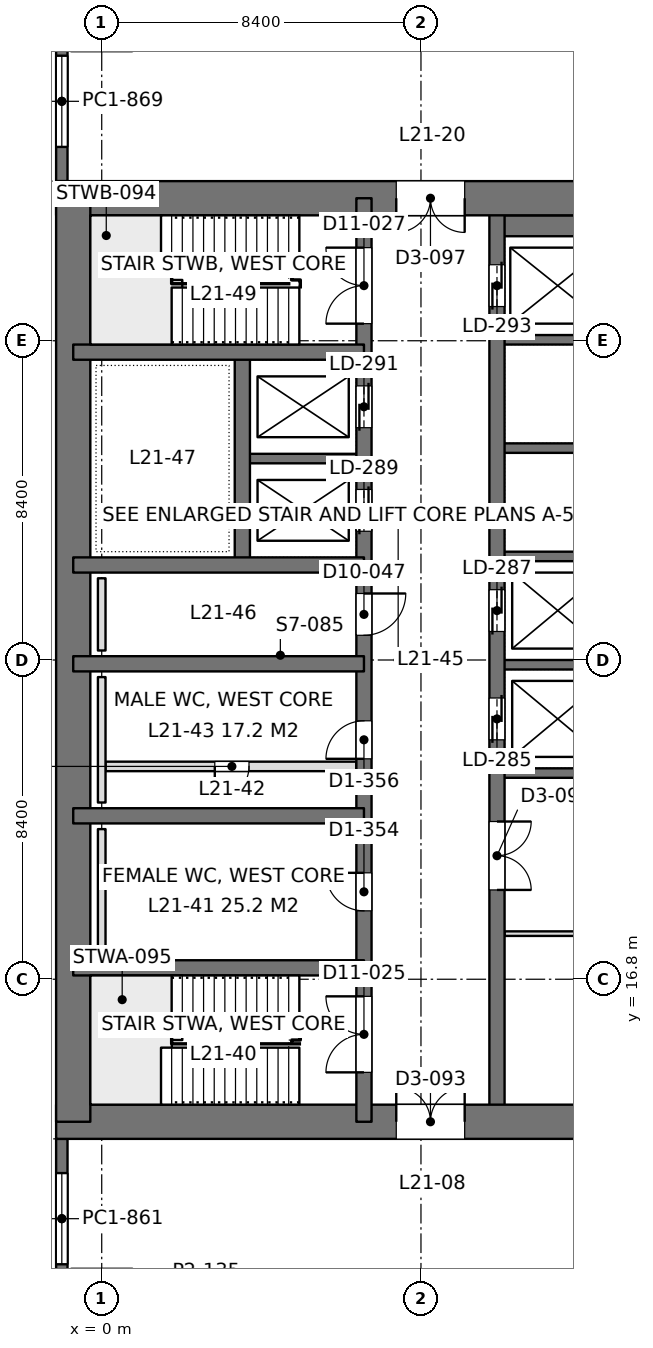
"""IFC4 building model, lengths in metres.
Left out: names, types, materials, properties, quantities, classifications, styles, units other than length and angle.
Written with IfcOpenShell. Run it as: python <this file> out.ifc"""

import sys

from ifc_helpers import new_model, si_unit, direction, frame, frame_2d, origin, place, context, subcontext, project, spatial, rectangle, extrude, element, fill, save


model = new_model("IFC4")
c1 = context("Model", 3, precision=1e-05, world=origin(), true_north=direction((0.0, 1.0)))
c2 = subcontext(c1, "Body", "Model", "MODEL_VIEW")
j1 = project(units=[si_unit("LENGTHUNIT", "METRE"), si_unit("PLANEANGLEUNIT", "RADIAN")], contexts=[c1])
p1 = place(None, origin())
s1 = spatial("IfcSite", under=j1, at=p1, CompositionType="ELEMENT")
p2 = place(p1, origin())
s2 = spatial("IfcBuilding", under=s1, at=p2, CompositionType="ELEMENT")
p3 = place(p2, frame((0.0, 0.0, 96.3)))
s3 = spatial("IfcBuildingStorey", under=s2, at=p3, CompositionType="ELEMENT", Elevation=96.3)
p4 = place(p3, frame((-1.2, 13.05, 0.0), z_axis=(0.0, 0.0, 1.0), x_axis=(1.0, 0.0, 0.0)))
e1 = element("IfcWall", 1, at=p4, inside=s3, PredefinedType="SHEAR", context=c2, shape_type="SweptSolid", body=[
    extrude(rectangle(XDim=18.0, YDim=0.9, at=frame_2d((9.0, 0.0))), origin(), (0.0, 0.0, 1.0), 4.5),
])
p5 = place(p4, frame((8.95, 0.0, 0.0)))
e2 = element("IfcOpeningElement", 2, at=p5, cuts=e1, PredefinedType="OPENING", context=c2, shape_type="SweptSolid", body=[
    extrude(rectangle(XDim=1.8, YDim=2.4, at=frame_2d((0.9, 1.2))), frame((0.0, 0.46, 0.0), z_axis=(0.0, -1.0, 0.0), x_axis=(1.0, 0.0, 0.0)), (0.0, 0.0, 1.0), 0.92),
])
p6 = place(p3, frame((-1.2, 37.35, 0.0), z_axis=(0.0, 0.0, 1.0), x_axis=(1.0, 0.0, 0.0)))
e3 = element("IfcWall", 3, at=p6, inside=s3, PredefinedType="SHEAR", context=c2, shape_type="SweptSolid", body=[
    extrude(rectangle(XDim=18.0, YDim=0.9, at=frame_2d((9.0, 0.0))), origin(), (0.0, 0.0, 1.0), 4.5),
])
p7 = place(p6, frame((8.95, 0.0, 0.0)))
e4 = element("IfcOpeningElement", 4, at=p7, cuts=e3, PredefinedType="OPENING", context=c2, shape_type="SweptSolid", body=[
    extrude(rectangle(XDim=1.8, YDim=2.4, at=frame_2d((0.9, 1.2))), frame((0.0, 0.46, 0.0), z_axis=(0.0, -1.0, 0.0), x_axis=(1.0, 0.0, 0.0)), (0.0, 0.0, 1.0), 0.92),
])
p8 = place(p3, frame((-0.75, 13.05, 0.0), z_axis=(0.0, 0.0, 1.0), x_axis=(0.0, 1.0, 0.0)))
e5 = element("IfcWall", 5, at=p8, inside=s3, PredefinedType="SHEAR", context=c2, shape_type="SweptSolid", body=[
    extrude(rectangle(XDim=24.3, YDim=0.9, at=frame_2d((12.15, 0.0))), origin(), (0.0, 0.0, 1.0), 4.5),
])
p9 = place(p3, frame((6.9, 13.05, 0.0), z_axis=(0.0, 0.0, 1.0), x_axis=(0.0, 1.0, 0.0)))
e6 = element("IfcWall", 6, at=p9, inside=s3, PredefinedType="SHEAR", context=c2, shape_type="SweptSolid", body=[
    extrude(rectangle(XDim=24.3, YDim=0.4, at=frame_2d((12.15, 0.0))), origin(), (0.0, 0.0, 1.0), 4.5),
])
p10 = place(p9, frame((1.3, 0.0, 0.0)))
e7 = element("IfcOpeningElement", 7, at=p10, cuts=e6, PredefinedType="OPENING", context=c2, shape_type="SweptSolid", body=[
    extrude(rectangle(XDim=2.0, YDim=2.2, at=frame_2d((1.0, 1.1))), frame((0.0, 0.21, 0.0), z_axis=(0.0, -1.0, 0.0), x_axis=(1.0, 0.0, 0.0)), (0.0, 0.0, 1.0), 0.42),
])
p11 = place(p9, frame((21.0, 0.0, 0.0)))
e8 = element("IfcOpeningElement", 8, at=p11, cuts=e6, PredefinedType="OPENING", context=c2, shape_type="SweptSolid", body=[
    extrude(rectangle(XDim=2.0, YDim=2.2, at=frame_2d((1.0, 1.1))), frame((0.0, 0.21, 0.0), z_axis=(0.0, -1.0, 0.0), x_axis=(1.0, 0.0, 0.0)), (0.0, 0.0, 1.0), 0.42),
])
p12 = place(p9, frame((5.55, 0.0, 0.0)))
e9 = element("IfcOpeningElement", 9, at=p12, cuts=e6, PredefinedType="OPENING", context=c2, shape_type="SweptSolid", body=[
    extrude(rectangle(XDim=1.0, YDim=2.2, at=frame_2d((0.5, 1.1))), frame((0.0, 0.21, 0.0), z_axis=(0.0, -1.0, 0.0), x_axis=(1.0, 0.0, 0.0)), (0.0, 0.0, 1.0), 0.42),
])
p13 = place(p9, frame((9.55, 0.0, 0.0)))
e10 = element("IfcOpeningElement", 10, at=p13, cuts=e6, PredefinedType="OPENING", context=c2, shape_type="SweptSolid", body=[
    extrude(rectangle(XDim=1.0, YDim=2.2, at=frame_2d((0.5, 1.1))), frame((0.0, 0.21, 0.0), z_axis=(0.0, -1.0, 0.0), x_axis=(1.0, 0.0, 0.0)), (0.0, 0.0, 1.0), 0.42),
])
p14 = place(p9, frame((12.8, 0.0, 0.0)))
e11 = element("IfcOpeningElement", 11, at=p14, cuts=e6, PredefinedType="OPENING", context=c2, shape_type="SweptSolid", body=[
    extrude(rectangle(XDim=1.1, YDim=2.2, at=frame_2d((0.55, 1.1))), frame((0.0, 0.21, 0.0), z_axis=(0.0, -1.0, 0.0), x_axis=(1.0, 0.0, 0.0)), (0.0, 0.0, 1.0), 0.42),
])
p15 = place(p9, frame((15.538, 0.0, 0.0)))
e12 = element("IfcOpeningElement", 12, at=p15, cuts=e6, PredefinedType="OPENING", context=c2, shape_type="SweptSolid", body=[
    extrude(rectangle(XDim=1.1, YDim=2.2, at=frame_2d((0.55, 1.1))), frame((0.0, 0.21, 0.0), z_axis=(0.0, -1.0, 0.0), x_axis=(1.0, 0.0, 0.0)), (0.0, 0.0, 1.0), 0.42),
])
p16 = place(p9, frame((18.262, 0.0, 0.0)))
e13 = element("IfcOpeningElement", 13, at=p16, cuts=e6, PredefinedType="OPENING", context=c2, shape_type="SweptSolid", body=[
    extrude(rectangle(XDim=1.1, YDim=2.2, at=frame_2d((0.55, 1.1))), frame((0.0, 0.21, 0.0), z_axis=(0.0, -1.0, 0.0), x_axis=(1.0, 0.0, 0.0)), (0.0, 0.0, 1.0), 0.42),
])
p17 = place(p3, frame((10.4, 13.05, 0.0), z_axis=(0.0, 0.0, 1.0), x_axis=(0.0, 1.0, 0.0)))
e14 = element("IfcWall", 14, at=p17, inside=s3, PredefinedType="SHEAR", context=c2, shape_type="SweptSolid", body=[
    extrude(rectangle(XDim=24.3, YDim=0.4, at=frame_2d((12.15, 0.0))), origin(), (0.0, 0.0, 1.0), 4.5),
])
p18 = place(p17, frame((10.05, 0.0, 0.0)))
e15 = element("IfcOpeningElement", 15, at=p18, cuts=e14, PredefinedType="OPENING", context=c2, shape_type="SweptSolid", body=[
    extrude(rectangle(XDim=1.1, YDim=2.2, at=frame_2d((0.55, 1.1))), frame((0.0, 0.21, 0.0), z_axis=(0.0, -1.0, 0.0), x_axis=(1.0, 0.0, 0.0)), (0.0, 0.0, 1.0), 0.42),
])
p19 = place(p17, frame((12.9, 0.0, 0.0)))
e16 = element("IfcOpeningElement", 16, at=p19, cuts=e14, PredefinedType="OPENING", context=c2, shape_type="SweptSolid", body=[
    extrude(rectangle(XDim=1.1, YDim=2.2, at=frame_2d((0.55, 1.1))), frame((0.0, 0.21, 0.0), z_axis=(0.0, -1.0, 0.0), x_axis=(1.0, 0.0, 0.0)), (0.0, 0.0, 1.0), 0.42),
])
p20 = place(p17, frame((21.45, 0.0, 0.0)))
e17 = element("IfcOpeningElement", 17, at=p20, cuts=e14, PredefinedType="OPENING", context=c2, shape_type="SweptSolid", body=[
    extrude(rectangle(XDim=1.1, YDim=2.2, at=frame_2d((0.55, 1.1))), frame((0.0, 0.21, 0.0), z_axis=(0.0, -1.0, 0.0), x_axis=(1.0, 0.0, 0.0)), (0.0, 0.0, 1.0), 0.42),
])
p21 = place(p17, frame((6.1, 0.0, 0.0)))
e18 = element("IfcOpeningElement", 18, at=p21, cuts=e14, PredefinedType="OPENING", context=c2, shape_type="SweptSolid", body=[
    extrude(rectangle(XDim=1.8, YDim=2.4, at=frame_2d((0.9, 1.2))), frame((0.0, 0.21, 0.0), z_axis=(0.0, -1.0, 0.0), x_axis=(1.0, 0.0, 0.0)), (0.0, 0.0, 1.0), 0.42),
])
for number, where, z_axis, x_axis in (
    (19, (-0.75, 17.1, 0.0), (0.0, 0.0, 1.0), (1.0, 0.0, 0.0)),
    (20, (-0.75, 21.1, 0.0), (0.0, 0.0, 1.0), (1.0, 0.0, 0.0)),
    (21, (-0.75, 25.1, 0.0), (0.0, 0.0, 1.0), (1.0, 0.0, 0.0)),
    (22, (-0.75, 27.7, 0.0), (0.0, 0.0, 1.0), (1.0, 0.0, 0.0)),
    (23, (-0.75, 33.3, 0.0), (0.0, 0.0, 1.0), (1.0, 0.0, 0.0)),
):
    element("IfcWall", number, at=place(p3, frame(where, z_axis=z_axis, x_axis=x_axis)), inside=s3, PredefinedType="SHEAR", context=c2, shape_type="SweptSolid", body=[
        extrude(rectangle(XDim=7.65, YDim=0.4, at=frame_2d((3.825, 0.0))), origin(), (0.0, 0.0, 1.0), 4.5),
    ])
p22 = place(p3, frame((3.7, 27.7, 0.0), z_axis=(0.0, 0.0, 1.0), x_axis=(0.0, 1.0, 0.0)))
e24 = element("IfcWall", 24, at=p22, inside=s3, PredefinedType="SHEAR", context=c2, shape_type="SweptSolid", body=[
    extrude(rectangle(XDim=5.6, YDim=0.4, at=frame_2d((2.8, 0.0))), origin(), (0.0, 0.0, 1.0), 4.5),
])
p23 = place(p3, frame((3.7, 30.5, 0.0), z_axis=(0.0, 0.0, 1.0), x_axis=(1.0, 0.0, 0.0)))
e25 = element("IfcWall", 25, at=p23, inside=s3, PredefinedType="SHEAR", context=c2, shape_type="SweptSolid", body=[
    extrude(rectangle(XDim=3.2, YDim=0.25, at=frame_2d((1.6, 0.0))), origin(), (0.0, 0.0, 1.0), 4.5),
])
p24 = place(p3, frame((10.4, 22.225, 0.0), z_axis=(0.0, 0.0, 1.0), x_axis=(1.0, 0.0, 0.0)))
e26 = element("IfcWall", 26, at=p24, inside=s3, PredefinedType="SHEAR", context=c2, shape_type="SweptSolid", body=[
    extrude(rectangle(XDim=5.95, YDim=0.25, at=frame_2d((2.975, 0.0))), origin(), (0.0, 0.0, 1.0), 4.5),
])
for number, where, z_axis, x_axis in (
    (27, (10.4, 25.075, 0.0), (0.0, 0.0, 1.0), (1.0, 0.0, 0.0)),
    (28, (10.4, 27.925, 0.0), (0.0, 0.0, 1.0), (1.0, 0.0, 0.0)),
    (29, (10.4, 30.775, 0.0), (0.0, 0.0, 1.0), (1.0, 0.0, 0.0)),
    (30, (10.4, 33.625, 0.0), (0.0, 0.0, 1.0), (1.0, 0.0, 0.0)),
):
    element("IfcWall", number, at=place(p3, frame(where, z_axis=z_axis, x_axis=x_axis)), inside=s3, PredefinedType="SHEAR", context=c2, shape_type="SweptSolid", body=[
        extrude(rectangle(XDim=3.2, YDim=0.25, at=frame_2d((1.6, 0.0))), origin(), (0.0, 0.0, 1.0), 4.5),
    ])
p25 = place(p3, frame((10.4, 36.625, 0.0), z_axis=(0.0, 0.0, 1.0), x_axis=(1.0, 0.0, 0.0)))
e31 = element("IfcWall", 31, at=p25, inside=s3, PredefinedType="SHEAR", context=c2, shape_type="SweptSolid", body=[
    extrude(rectangle(XDim=3.2, YDim=0.55, at=frame_2d((1.6, 0.0))), origin(), (0.0, 0.0, 1.0), 4.5),
])
p26 = place(p3, frame((-1.05, 8.4, 0.0), z_axis=(0.0, 0.0, 1.0), x_axis=(0.0, 1.0, 0.0)))
e32 = element("IfcWall", 32, at=p26, inside=s3, PredefinedType="SOLIDWALL", context=c2, shape_type="SweptSolid", body=[
    extrude(rectangle(XDim=4.2, YDim=0.3, at=frame_2d((2.1, 0.0))), origin(), (0.0, 0.0, 1.0), 4.35),
])
p27 = place(p26, frame((0.9, 0.0, 0.9)))
e33 = element("IfcOpeningElement", 33, at=p27, cuts=e32, PredefinedType="OPENING", context=c2, shape_type="SweptSolid", body=[
    extrude(rectangle(XDim=2.4, YDim=1.9, at=frame_2d((1.2, 0.95))), frame((0.0, 0.16, 0.0), z_axis=(0.0, -1.0, 0.0), x_axis=(1.0, 0.0, 0.0)), (0.0, 0.0, 1.0), 0.32),
])
p28 = place(p3, frame((-1.05, 37.8, 0.0), z_axis=(0.0, 0.0, 1.0), x_axis=(0.0, 1.0, 0.0)))
e34 = element("IfcWall", 34, at=p28, inside=s3, PredefinedType="SOLIDWALL", context=c2, shape_type="SweptSolid", body=[
    extrude(rectangle(XDim=4.2, YDim=0.3, at=frame_2d((2.1, 0.0))), origin(), (0.0, 0.0, 1.0), 4.35),
])
p29 = place(p28, frame((0.9, 0.0, 0.9)))
e35 = element("IfcOpeningElement", 35, at=p29, cuts=e34, PredefinedType="OPENING", context=c2, shape_type="SweptSolid", body=[
    extrude(rectangle(XDim=2.4, YDim=1.9, at=frame_2d((1.2, 0.95))), frame((0.0, 0.16, 0.0), z_axis=(0.0, -1.0, 0.0), x_axis=(1.0, 0.0, 0.0)), (0.0, 0.0, 1.0), 0.32),
])
p30 = place(p3, frame((10.598, 18.0, 0.0), z_axis=(0.0, 0.0, 1.0), x_axis=(1.0, 0.0, 0.0)))
e36 = element("IfcWall", 36, at=p30, inside=s3, PredefinedType="PARTITIONING", context=c2, shape_type="SweptSolid", body=[
    extrude(rectangle(XDim=5.904, YDim=0.12, at=frame_2d((2.952, 0.0))), origin(), (0.0, 0.0, 1.0), 3.85),
])
p31 = place(p3, frame((0.1, 22.4, 0.0), z_axis=(0.0, 0.0, 1.0), x_axis=(1.0, 0.0, 0.0)))
e37 = element("IfcWall", 37, at=p31, inside=s3, PredefinedType="PARTITIONING", context=c2, shape_type="SweptSolid", body=[
    extrude(rectangle(XDim=6.6, YDim=0.25, at=frame_2d((3.3, 0.0))), origin(), (0.0, 0.0, 1.0), 4.3),
])
p32 = place(p31, frame((2.875, 0.0, 0.0)))
e38 = element("IfcOpeningElement", 38, at=p32, cuts=e37, PredefinedType="OPENING", context=c2, shape_type="SweptSolid", body=[
    extrude(rectangle(XDim=0.9, YDim=2.2, at=frame_2d((0.45, 1.1))), frame((0.0, 0.135, 0.0), z_axis=(0.0, -1.0, 0.0), x_axis=(1.0, 0.0, 0.0)), (0.0, 0.0, 1.0), 0.27),
])
for number, where, z_axis, x_axis in (
    (39, (0.0, 17.45, 0.0), (0.0, 0.0, 1.0), (0.0, 1.0, 0.0)),
    (40, (0.0, 21.45, 0.0), (0.0, 0.0, 1.0), (0.0, 1.0, 0.0)),
):
    element("IfcWall", number, at=place(p3, frame(where, z_axis=z_axis, x_axis=x_axis)), inside=s3, PredefinedType="PLUMBINGWALL", context=c2, shape_type="SweptSolid", body=[
        extrude(rectangle(XDim=3.3, YDim=0.2, at=frame_2d((1.65, 0.0))), origin(), (0.0, 0.0, 1.0), 1.2),
    ])
p33 = place(p3, frame((0.0, 25.45, 0.0), z_axis=(0.0, 0.0, 1.0), x_axis=(0.0, 1.0, 0.0)))
e41 = element("IfcWall", 41, at=p33, inside=s3, PredefinedType="PLUMBINGWALL", context=c2, shape_type="SweptSolid", body=[
    extrude(rectangle(XDim=1.9, YDim=0.2, at=frame_2d((0.95, 0.0))), origin(), (0.0, 0.0, 1.0), 1.2),
])
p34 = place(p27, origin())
e42 = element("IfcWindow", 42, at=p34, inside=s3, PartitioningType="SINGLE_PANEL", PredefinedType="WINDOW", context=c2, shape_type="SweptSolid", body=[
    extrude(rectangle(XDim=2.4, YDim=1.9, at=frame_2d((1.2, 0.95))), frame((0.0, 0.03, 0.0), z_axis=(0.0, -1.0, 0.0), x_axis=(1.0, 0.0, 0.0)), (0.0, 0.0, 1.0), 0.06),
])
fill(e33, e42)
p35 = place(p29, origin())
e43 = element("IfcWindow", 43, at=p35, inside=s3, PartitioningType="SINGLE_PANEL", PredefinedType="WINDOW", context=c2, shape_type="SweptSolid", body=[
    extrude(rectangle(XDim=2.4, YDim=1.9, at=frame_2d((1.2, 0.95))), frame((0.0, 0.03, 0.0), z_axis=(0.0, -1.0, 0.0), x_axis=(1.0, 0.0, 0.0)), (0.0, 0.0, 1.0), 0.06),
])
fill(e35, e43)
p36 = place(p5, origin())
e44 = element("IfcDoor", 44, at=p36, inside=s3, OperationType="DOUBLE_DOOR_SINGLE_SWING", PredefinedType="DOOR", context=c2, shape_type="SweptSolid", body=[
    extrude(rectangle(XDim=1.8, YDim=2.4, at=frame_2d((0.9, 1.2))), frame((0.0, 0.025, 0.0), z_axis=(0.0, -1.0, 0.0), x_axis=(1.0, 0.0, 0.0)), (0.0, 0.0, 1.0), 0.05),
])
fill(e2, e44)
p37 = place(p7, frame((1.8, 0.0, 0.0), z_axis=(0.0, 0.0, 1.0), x_axis=(-1.0, 0.0, 0.0)))
e45 = element("IfcDoor", 45, at=p37, inside=s3, OperationType="DOUBLE_DOOR_SINGLE_SWING", PredefinedType="DOOR", context=c2, shape_type="SweptSolid", body=[
    extrude(rectangle(XDim=1.8, YDim=2.4, at=frame_2d((0.9, 1.2))), frame((0.0, 0.025, 0.0), z_axis=(0.0, -1.0, 0.0), x_axis=(1.0, 0.0, 0.0)), (0.0, 0.0, 1.0), 0.05),
])
fill(e4, e45)
p38 = place(p10, origin())
e46 = element("IfcDoor", 46, at=p38, inside=s3, OperationType="DOUBLE_DOOR_SINGLE_SWING", PredefinedType="DOOR", context=c2, shape_type="SweptSolid", body=[
    extrude(rectangle(XDim=2.0, YDim=2.2, at=frame_2d((1.0, 1.1))), frame((0.0, 0.025, 0.0), z_axis=(0.0, -1.0, 0.0), x_axis=(1.0, 0.0, 0.0)), (0.0, 0.0, 1.0), 0.05),
])
fill(e7, e46)
p39 = place(p11, origin())
e47 = element("IfcDoor", 47, at=p39, inside=s3, OperationType="DOUBLE_DOOR_SINGLE_SWING", PredefinedType="DOOR", context=c2, shape_type="SweptSolid", body=[
    extrude(rectangle(XDim=2.0, YDim=2.2, at=frame_2d((1.0, 1.1))), frame((0.0, 0.025, 0.0), z_axis=(0.0, -1.0, 0.0), x_axis=(1.0, 0.0, 0.0)), (0.0, 0.0, 1.0), 0.05),
])
fill(e8, e47)
p40 = place(p12, origin())
e48 = element("IfcDoor", 48, at=p40, inside=s3, OperationType="SINGLE_SWING_RIGHT", PredefinedType="DOOR", context=c2, shape_type="SweptSolid", body=[
    extrude(rectangle(XDim=1.0, YDim=2.2, at=frame_2d((0.5, 1.1))), frame((0.0, 0.025, 0.0), z_axis=(0.0, -1.0, 0.0), x_axis=(1.0, 0.0, 0.0)), (0.0, 0.0, 1.0), 0.05),
])
fill(e9, e48)
p41 = place(p13, origin())
e49 = element("IfcDoor", 49, at=p41, inside=s3, OperationType="SINGLE_SWING_LEFT", PredefinedType="DOOR", context=c2, shape_type="SweptSolid", body=[
    extrude(rectangle(XDim=1.0, YDim=2.2, at=frame_2d((0.5, 1.1))), frame((0.0, 0.025, 0.0), z_axis=(0.0, -1.0, 0.0), x_axis=(1.0, 0.0, 0.0)), (0.0, 0.0, 1.0), 0.05),
])
fill(e10, e49)
p42 = place(p14, frame((1.1, 0.0, 0.0), z_axis=(0.0, 0.0, 1.0), x_axis=(-1.0, 0.0, 0.0)))
e50 = element("IfcDoor", 50, at=p42, inside=s3, OperationType="SINGLE_SWING_LEFT", PredefinedType="DOOR", context=c2, shape_type="SweptSolid", body=[
    extrude(rectangle(XDim=1.1, YDim=2.2, at=frame_2d((0.55, 1.1))), frame((0.0, 0.025, 0.0), z_axis=(0.0, -1.0, 0.0), x_axis=(1.0, 0.0, 0.0)), (0.0, 0.0, 1.0), 0.05),
])
fill(e11, e50)
p43 = place(p18, origin())
e51 = element("IfcDoor", 51, at=p43, inside=s3, OperationType="DOUBLE_DOOR_SLIDING", PredefinedType="DOOR", context=c2, shape_type="SweptSolid", body=[
    extrude(rectangle(XDim=1.1, YDim=2.2, at=frame_2d((0.55, 1.1))), frame((0.0, 0.025, 0.0), z_axis=(0.0, -1.0, 0.0), x_axis=(1.0, 0.0, 0.0)), (0.0, 0.0, 1.0), 0.05),
])
fill(e15, e51)
p44 = place(p19, origin())
e52 = element("IfcDoor", 52, at=p44, inside=s3, OperationType="DOUBLE_DOOR_SLIDING", PredefinedType="DOOR", context=c2, shape_type="SweptSolid", body=[
    extrude(rectangle(XDim=1.1, YDim=2.2, at=frame_2d((0.55, 1.1))), frame((0.0, 0.025, 0.0), z_axis=(0.0, -1.0, 0.0), x_axis=(1.0, 0.0, 0.0)), (0.0, 0.0, 1.0), 0.05),
])
fill(e16, e52)
p45 = place(p20, origin())
e53 = element("IfcDoor", 53, at=p45, inside=s3, OperationType="DOUBLE_DOOR_SLIDING", PredefinedType="DOOR", context=c2, shape_type="SweptSolid", body=[
    extrude(rectangle(XDim=1.1, YDim=2.2, at=frame_2d((0.55, 1.1))), frame((0.0, 0.025, 0.0), z_axis=(0.0, -1.0, 0.0), x_axis=(1.0, 0.0, 0.0)), (0.0, 0.0, 1.0), 0.05),
])
fill(e17, e53)
p46 = place(p15, origin())
e54 = element("IfcDoor", 54, at=p46, inside=s3, OperationType="DOUBLE_DOOR_SLIDING", PredefinedType="DOOR", context=c2, shape_type="SweptSolid", body=[
    extrude(rectangle(XDim=1.1, YDim=2.2, at=frame_2d((0.55, 1.1))), frame((0.0, 0.025, 0.0), z_axis=(0.0, -1.0, 0.0), x_axis=(1.0, 0.0, 0.0)), (0.0, 0.0, 1.0), 0.05),
])
fill(e12, e54)
p47 = place(p16, origin())
e55 = element("IfcDoor", 55, at=p47, inside=s3, OperationType="DOUBLE_DOOR_SLIDING", PredefinedType="DOOR", context=c2, shape_type="SweptSolid", body=[
    extrude(rectangle(XDim=1.1, YDim=2.2, at=frame_2d((0.55, 1.1))), frame((0.0, 0.025, 0.0), z_axis=(0.0, -1.0, 0.0), x_axis=(1.0, 0.0, 0.0)), (0.0, 0.0, 1.0), 0.05),
])
fill(e13, e55)
p48 = place(p21, frame((1.8, 0.0, 0.0), z_axis=(0.0, 0.0, 1.0), x_axis=(-1.0, 0.0, 0.0)))
e56 = element("IfcDoor", 56, at=p48, inside=s3, OperationType="DOUBLE_DOOR_SINGLE_SWING", PredefinedType="DOOR", context=c2, shape_type="SweptSolid", body=[
    extrude(rectangle(XDim=1.8, YDim=2.4, at=frame_2d((0.9, 1.2))), frame((0.0, 0.025, 0.0), z_axis=(0.0, -1.0, 0.0), x_axis=(1.0, 0.0, 0.0)), (0.0, 0.0, 1.0), 0.05),
])
fill(e18, e56)
p49 = place(p32, frame((0.9, 0.0, 0.0), z_axis=(0.0, 0.0, 1.0), x_axis=(-1.0, 0.0, 0.0)))
e57 = element("IfcDoor", 57, at=p49, inside=s3, OperationType="SINGLE_SWING_RIGHT", PredefinedType="DOOR", context=c2, shape_type="SweptSolid", body=[
    extrude(rectangle(XDim=0.9, YDim=2.2, at=frame_2d((0.45, 1.1))), frame((0.0, 0.025, 0.0), z_axis=(0.0, -1.0, 0.0), x_axis=(1.0, 0.0, 0.0)), (0.0, 0.0, 1.0), 0.05),
])
fill(e38, e57)
save(model, sys.argv[1])
